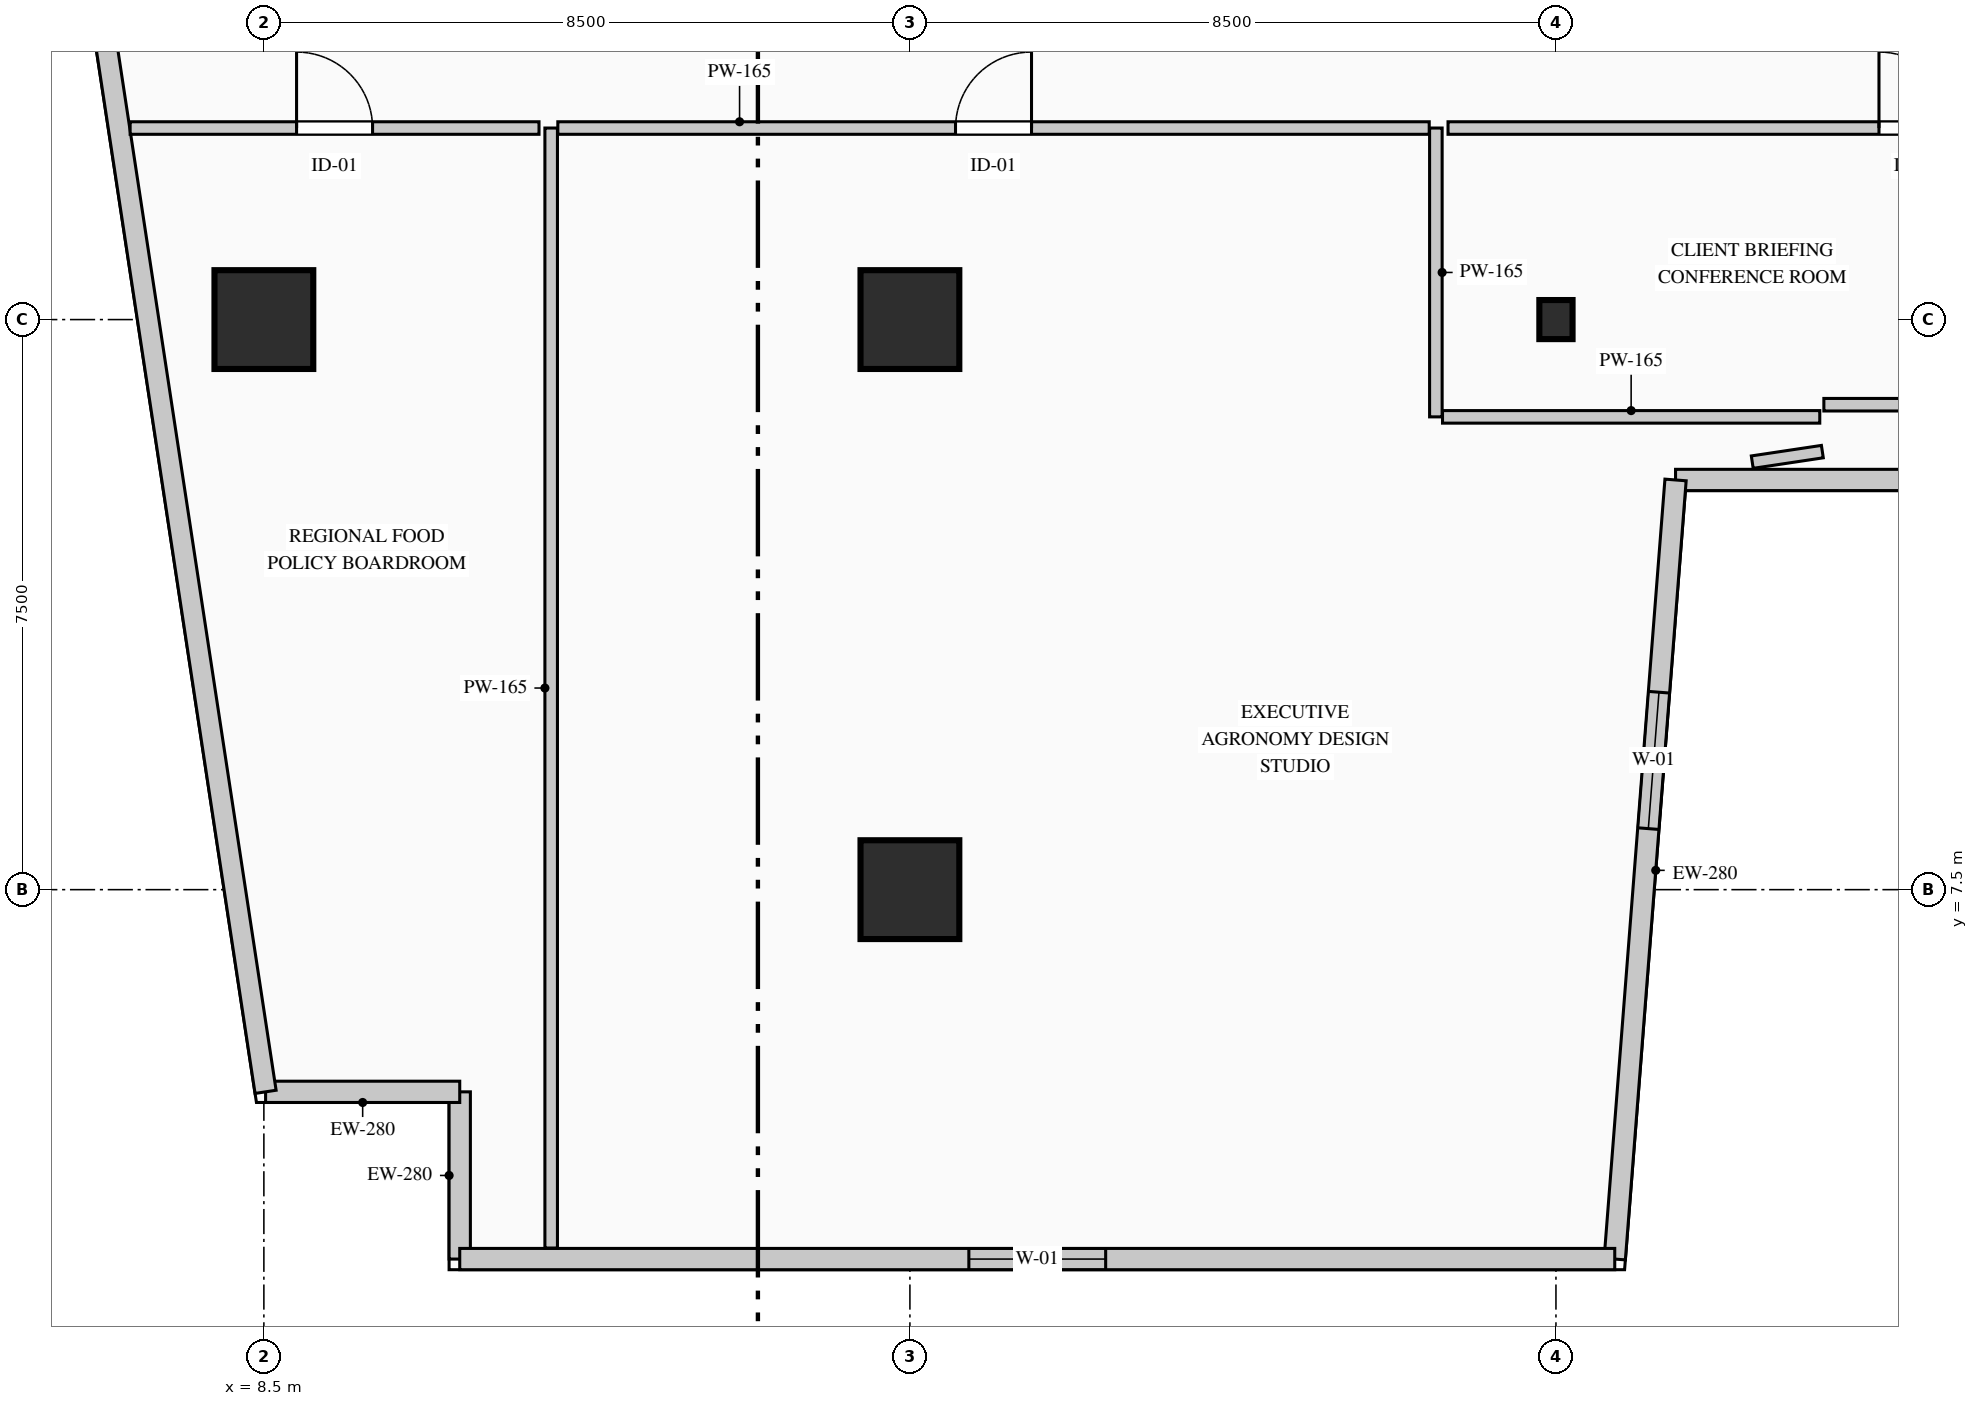
"""IFC4 building model, lengths in metres.
Left out: names, types, materials, properties, quantities, classifications, styles, units other than length and angle.
Written with IfcOpenShell. Run it as: python <this file> out.ifc"""

import sys

from ifc_helpers import new_model, si_unit, direction, frame, frame_2d, origin, origin_2d, place, context, subcontext, project, spatial, rectangle, i_section, extrude, element, fill, save


model = new_model("IFC4")
c1 = context("Model", 3, precision=1e-05, world=origin(), true_north=direction((0.0, 1.0)))
c2 = subcontext(c1, "Body", "Model", "MODEL_VIEW")
j1 = project(units=[si_unit("LENGTHUNIT", "METRE"), si_unit("PLANEANGLEUNIT", "RADIAN")], contexts=[c1])
p1 = place(None, origin())
s1 = spatial("IfcSite", under=j1, at=p1, CompositionType="ELEMENT")
p2 = place(p1, origin())
s2 = spatial("IfcBuilding", under=s1, at=p2, CompositionType="ELEMENT")
p3 = place(p2, frame((0.0, 0.0, 101.8)))
s3 = spatial("IfcBuildingStorey", under=s2, at=p3, CompositionType="ELEMENT", Elevation=101.8)
for number, where, z_axis, x_axis in (
    (1, (8.5, 15.0, 0.0), (0.0, 0.0, 1.0), (1.0, 0.0, 0.0)),
    (2, (17.0, 7.5, 0.0), (0.0, 0.0, 1.0), (1.0, 0.0, 0.0)),
    (3, (17.0, 15.0, 0.0), (0.0, 0.0, 1.0), (1.0, 0.0, 0.0)),
):
    element("IfcColumn", number, at=place(p3, frame(where, z_axis=z_axis, x_axis=x_axis)), inside=s3, PredefinedType="COLUMN", context=c2, shape_type="SweptSolid", body=[
        extrude(rectangle(XDim=1.3, YDim=1.3, at=origin_2d()), origin(), (0.0, 0.0, 1.0), 4.4),
    ])
p4 = place(p3, frame((25.5, 15.0, 0.0), z_axis=(0.0, 0.0, 1.0), x_axis=(1.0, 0.0, 0.0)))
e4 = element("IfcColumn", 4, at=p4, inside=s3, PredefinedType="COLUMN", context=c2, shape_type="SweptSolid", body=[
    extrude(i_section(OverallWidth=0.437, OverallDepth=0.514, WebThickness=0.061, FlangeThickness=0.077, FilletRadius=0.015, at=origin_2d()), origin(), (0.0, 0.0, 1.0), 4.4),
])
p5 = place(p3, frame((11.077, 2.64, 0.0), z_axis=(0.0, 0.0, 1.0), x_axis=(0.0, 1.0, 0.0)))
e5 = element("IfcWall", 5, at=p5, inside=s3, PredefinedType="STANDARD", context=c2, shape_type="SweptSolid", body=[
    extrude(rectangle(XDim=2.2, YDim=0.28, at=frame_2d((1.1, 0.0))), origin(), (0.0, 0.0, 1.0), 4.05),
])
p6 = place(p3, frame((11.077, 4.84, 0.0), z_axis=(0.0, 0.0, 1.0), x_axis=(-1.0, 0.0, 0.0)))
e6 = element("IfcWall", 6, at=p6, inside=s3, PredefinedType="STANDARD", context=c2, shape_type="SweptSolid", body=[
    extrude(rectangle(XDim=2.554, YDim=0.28, at=frame_2d((1.277, 0.0))), origin(), (0.0, 0.0, 1.0), 4.05),
])
p7 = place(p3, frame((8.523, 4.84, 0.0), z_axis=(0.0, 0.0, 1.0), x_axis=(-0.150394554312, 0.988626055712, 0.0)))
e7 = element("IfcWall", 7, at=p7, inside=s3, PredefinedType="STANDARD", context=c2, shape_type="SweptSolid", body=[
    extrude(rectangle(XDim=36.738, YDim=0.28, at=frame_2d((18.369, 0.0))), origin(), (0.0, 0.0, 1.0), 4.05),
])
p8 = place(p7, frame((22.612, 0.0, 0.9)))
e8 = element("IfcOpeningElement", 8, at=p8, cuts=e7, PredefinedType="OPENING", context=c2, shape_type="SweptSolid", body=[
    extrude(rectangle(XDim=1.8, YDim=2.1, at=frame_2d((0.9, 1.05))), frame((0.0, 0.15, 0.0), z_axis=(0.0, -1.0, 0.0), x_axis=(1.0, 0.0, 0.0)), (0.0, 0.0, 1.0), 0.3),
])
p9 = place(p3, frame((35.77, 12.89, 0.0), z_axis=(0.0, 0.0, 1.0), x_axis=(-1.0, 0.0, 0.0)))
e9 = element("IfcWall", 9, at=p9, inside=s3, PredefinedType="STANDARD", context=c2, shape_type="SweptSolid", body=[
    extrude(rectangle(XDim=8.697, YDim=0.28, at=frame_2d((4.348, 0.0))), origin(), (0.0, 0.0, 1.0), 4.05),
])
p10 = place(p9, frame((3.448, 0.0, 0.9)))
e10 = element("IfcOpeningElement", 10, at=p10, cuts=e9, PredefinedType="OPENING", context=c2, shape_type="SweptSolid", body=[
    extrude(rectangle(XDim=1.8, YDim=2.1, at=frame_2d((0.9, 1.05))), frame((0.0, 0.15, 0.0), z_axis=(0.0, -1.0, 0.0), x_axis=(1.0, 0.0, 0.0)), (0.0, 0.0, 1.0), 0.3),
])
p11 = place(p3, frame((27.073, 12.89, 0.0), z_axis=(0.0, 0.0, 1.0), x_axis=(-0.077816860153, -0.996967670627, 0.0)))
e11 = element("IfcWall", 11, at=p11, inside=s3, PredefinedType="STANDARD", context=c2, shape_type="SweptSolid", body=[
    extrude(rectangle(XDim=10.281, YDim=0.28, at=frame_2d((5.141, 0.0))), origin(), (0.0, 0.0, 1.0), 4.05),
])
p12 = place(p11, frame((2.801, 0.0, 0.9)))
e12 = element("IfcOpeningElement", 12, at=p12, cuts=e11, PredefinedType="OPENING", context=c2, shape_type="SweptSolid", body=[
    extrude(rectangle(XDim=1.8, YDim=2.1, at=frame_2d((0.9, 1.05))), frame((0.0, 0.15, 0.0), z_axis=(0.0, -1.0, 0.0), x_axis=(1.0, 0.0, 0.0)), (0.0, 0.0, 1.0), 0.3),
])
p13 = place(p3, frame((26.273, 2.64, 0.0), z_axis=(0.0, 0.0, 1.0), x_axis=(-1.0, 0.0, 0.0)))
e13 = element("IfcWall", 13, at=p13, inside=s3, PredefinedType="STANDARD", context=c2, shape_type="SweptSolid", body=[
    extrude(rectangle(XDim=15.197, YDim=0.28, at=frame_2d((7.598, 0.0))), origin(), (0.0, 0.0, 1.0), 4.05),
])
p14 = place(p13, frame((6.698, 0.0, 0.9)))
e14 = element("IfcOpeningElement", 14, at=p14, cuts=e13, PredefinedType="OPENING", context=c2, shape_type="SweptSolid", body=[
    extrude(rectangle(XDim=1.8, YDim=2.1, at=frame_2d((0.9, 1.05))), frame((0.0, 0.15, 0.0), z_axis=(0.0, -1.0, 0.0), x_axis=(1.0, 0.0, 0.0)), (0.0, 0.0, 1.0), 0.3),
])
p15 = place(p3, frame((23.92, 17.52, 0.0), z_axis=(0.0, 0.0, 1.0), x_axis=(0.0, -1.0, 0.0)))
e15 = element("IfcWall", 15, at=p15, inside=s3, PredefinedType="PARTITIONING", context=c2, shape_type="SweptSolid", body=[
    extrude(rectangle(XDim=3.8, YDim=0.165, at=frame_2d((1.9, 0.0))), origin(), (0.0, 0.0, 1.0), 4.05),
])
p16 = place(p3, frame((24.008, 13.72, 0.0), z_axis=(0.0, 0.0, 1.0), x_axis=(1.0, 0.0, 0.0)))
e16 = element("IfcWall", 16, at=p16, inside=s3, PredefinedType="PARTITIONING", context=c2, shape_type="SweptSolid", body=[
    extrude(rectangle(XDim=4.963, YDim=0.165, at=frame_2d((2.482, 0.0))), origin(), (0.0, 0.0, 1.0), 4.05),
])
p17 = place(p3, frame((29.005, 13.263, 0.0), z_axis=(0.0, 0.0, 1.0), x_axis=(-0.988919061759, -0.148455681233, 0.0)))
e17 = element("IfcWall", 17, at=p17, inside=s3, PredefinedType="PARTITIONING", context=c2, shape_type="SweptSolid", body=[
    extrude(rectangle(XDim=0.932, YDim=0.165, at=frame_2d((0.466, 0.0))), origin(), (0.0, 0.0, 1.0), 4.05),
])
p18 = place(p3, frame((12.28, 2.785, 0.0), z_axis=(0.0, 0.0, 1.0), x_axis=(0.0, 1.0, 0.0)))
e18 = element("IfcWall", 18, at=p18, inside=s3, PredefinedType="PARTITIONING", context=c2, shape_type="SweptSolid", body=[
    extrude(rectangle(XDim=14.735, YDim=0.165, at=frame_2d((7.368, 0.0))), origin(), (0.0, 0.0, 1.0), 4.05),
])
p19 = place(p3, frame((12.367, 17.52, 0.0), z_axis=(0.0, 0.0, 1.0), x_axis=(1.0, 0.0, 0.0)))
e19 = element("IfcWall", 19, at=p19, inside=s3, PredefinedType="PARTITIONING", context=c2, shape_type="SweptSolid", body=[
    extrude(rectangle(XDim=11.465, YDim=0.165, at=frame_2d((5.732, 0.0))), origin(), (0.0, 0.0, 1.0), 4.05),
])
p20 = place(p19, frame((5.232, 0.0, 0.0)))
e20 = element("IfcOpeningElement", 20, at=p20, cuts=e19, PredefinedType="OPENING", context=c2, shape_type="SweptSolid", body=[
    extrude(rectangle(XDim=1.0, YDim=2.15, at=frame_2d((0.5, 1.075))), frame((0.0, 0.093, 0.0), z_axis=(0.0, -1.0, 0.0), x_axis=(1.0, 0.0, 0.0)), (0.0, 0.0, 1.0), 0.185),
])
p21 = place(p3, frame((6.74, 17.52, 0.0), z_axis=(0.0, 0.0, 1.0), x_axis=(1.0, 0.0, 0.0)))
e21 = element("IfcWall", 21, at=p21, inside=s3, PredefinedType="PARTITIONING", context=c2, shape_type="SweptSolid", body=[
    extrude(rectangle(XDim=5.38, YDim=0.165, at=frame_2d((2.69, 0.0))), origin(), (0.0, 0.0, 1.0), 4.05),
])
p22 = place(p21, frame((2.19, 0.0, 0.0)))
e22 = element("IfcOpeningElement", 22, at=p22, cuts=e21, PredefinedType="OPENING", context=c2, shape_type="SweptSolid", body=[
    extrude(rectangle(XDim=1.0, YDim=2.15, at=frame_2d((0.5, 1.075))), frame((0.0, 0.093, 0.0), z_axis=(0.0, -1.0, 0.0), x_axis=(1.0, 0.0, 0.0)), (0.0, 0.0, 1.0), 0.185),
])
p23 = place(p3, frame((24.08, 17.52, 0.0), z_axis=(0.0, 0.0, 1.0), x_axis=(1.0, 0.0, 0.0)))
e23 = element("IfcWall", 23, at=p23, inside=s3, PredefinedType="PARTITIONING", context=c2, shape_type="SweptSolid", body=[
    extrude(rectangle(XDim=12.34, YDim=0.165, at=frame_2d((6.17, 0.0))), origin(), (0.0, 0.0, 1.0), 3.635),
])
p24 = place(p23, frame((5.67, 0.0, 0.0)))
e24 = element("IfcOpeningElement", 24, at=p24, cuts=e23, PredefinedType="OPENING", context=c2, shape_type="SweptSolid", body=[
    extrude(rectangle(XDim=1.0, YDim=2.15, at=frame_2d((0.5, 1.075))), frame((0.0, 0.093, 0.0), z_axis=(0.0, -1.0, 0.0), x_axis=(1.0, 0.0, 0.0)), (0.0, 0.0, 1.0), 0.185),
])
p25 = place(p3, frame((36.42, 13.88, 0.0), z_axis=(0.0, 0.0, 1.0), x_axis=(-1.0, 0.0, 0.0)))
e25 = element("IfcWall", 25, at=p25, inside=s3, PredefinedType="PARTITIONING", context=c2, shape_type="SweptSolid", body=[
    extrude(rectangle(XDim=7.395, YDim=0.165, at=frame_2d((3.698, 0.0))), origin(), (0.0, 0.0, 1.0), 4.05),
])
p26 = place(p12, origin())
e26 = element("IfcWindow", 26, at=p26, inside=s3, PartitioningType="SINGLE_PANEL", PredefinedType="WINDOW", context=c2, shape_type="SweptSolid", body=[
    extrude(rectangle(XDim=1.8, YDim=2.1, at=frame_2d((0.9, 1.05))), frame((0.0, 0.03, 0.0), z_axis=(0.0, -1.0, 0.0), x_axis=(1.0, 0.0, 0.0)), (0.0, 0.0, 1.0), 0.06),
])
fill(e12, e26)
p27 = place(p14, origin())
e27 = element("IfcWindow", 27, at=p27, inside=s3, PartitioningType="SINGLE_PANEL", PredefinedType="WINDOW", context=c2, shape_type="SweptSolid", body=[
    extrude(rectangle(XDim=1.8, YDim=2.1, at=frame_2d((0.9, 1.05))), frame((0.0, 0.03, 0.0), z_axis=(0.0, -1.0, 0.0), x_axis=(1.0, 0.0, 0.0)), (0.0, 0.0, 1.0), 0.06),
])
fill(e14, e27)
p28 = place(p20, origin())
e28 = element("IfcDoor", 28, at=p28, inside=s3, OperationType="SINGLE_SWING_RIGHT", PredefinedType="DOOR", context=c2, shape_type="SweptSolid", body=[
    extrude(rectangle(XDim=1.0, YDim=2.15, at=frame_2d((0.5, 1.075))), frame((0.0, 0.025, 0.0), z_axis=(0.0, -1.0, 0.0), x_axis=(1.0, 0.0, 0.0)), (0.0, 0.0, 1.0), 0.05),
])
fill(e20, e28)
p29 = place(p22, origin())
e29 = element("IfcDoor", 29, at=p29, inside=s3, OperationType="SINGLE_SWING_LEFT", PredefinedType="DOOR", context=c2, shape_type="SweptSolid", body=[
    extrude(rectangle(XDim=1.0, YDim=2.15, at=frame_2d((0.5, 1.075))), frame((0.0, 0.025, 0.0), z_axis=(0.0, -1.0, 0.0), x_axis=(1.0, 0.0, 0.0)), (0.0, 0.0, 1.0), 0.05),
])
fill(e22, e29)
p30 = place(p24, origin())
e30 = element("IfcDoor", 30, at=p30, inside=s3, OperationType="SINGLE_SWING_LEFT", PredefinedType="DOOR", context=c2, shape_type="SweptSolid", body=[
    extrude(rectangle(XDim=1.0, YDim=2.15, at=frame_2d((0.5, 1.075))), frame((0.0, 0.025, 0.0), z_axis=(0.0, -1.0, 0.0), x_axis=(1.0, 0.0, 0.0)), (0.0, 0.0, 1.0), 0.05),
])
fill(e24, e30)
save(model, sys.argv[1])
